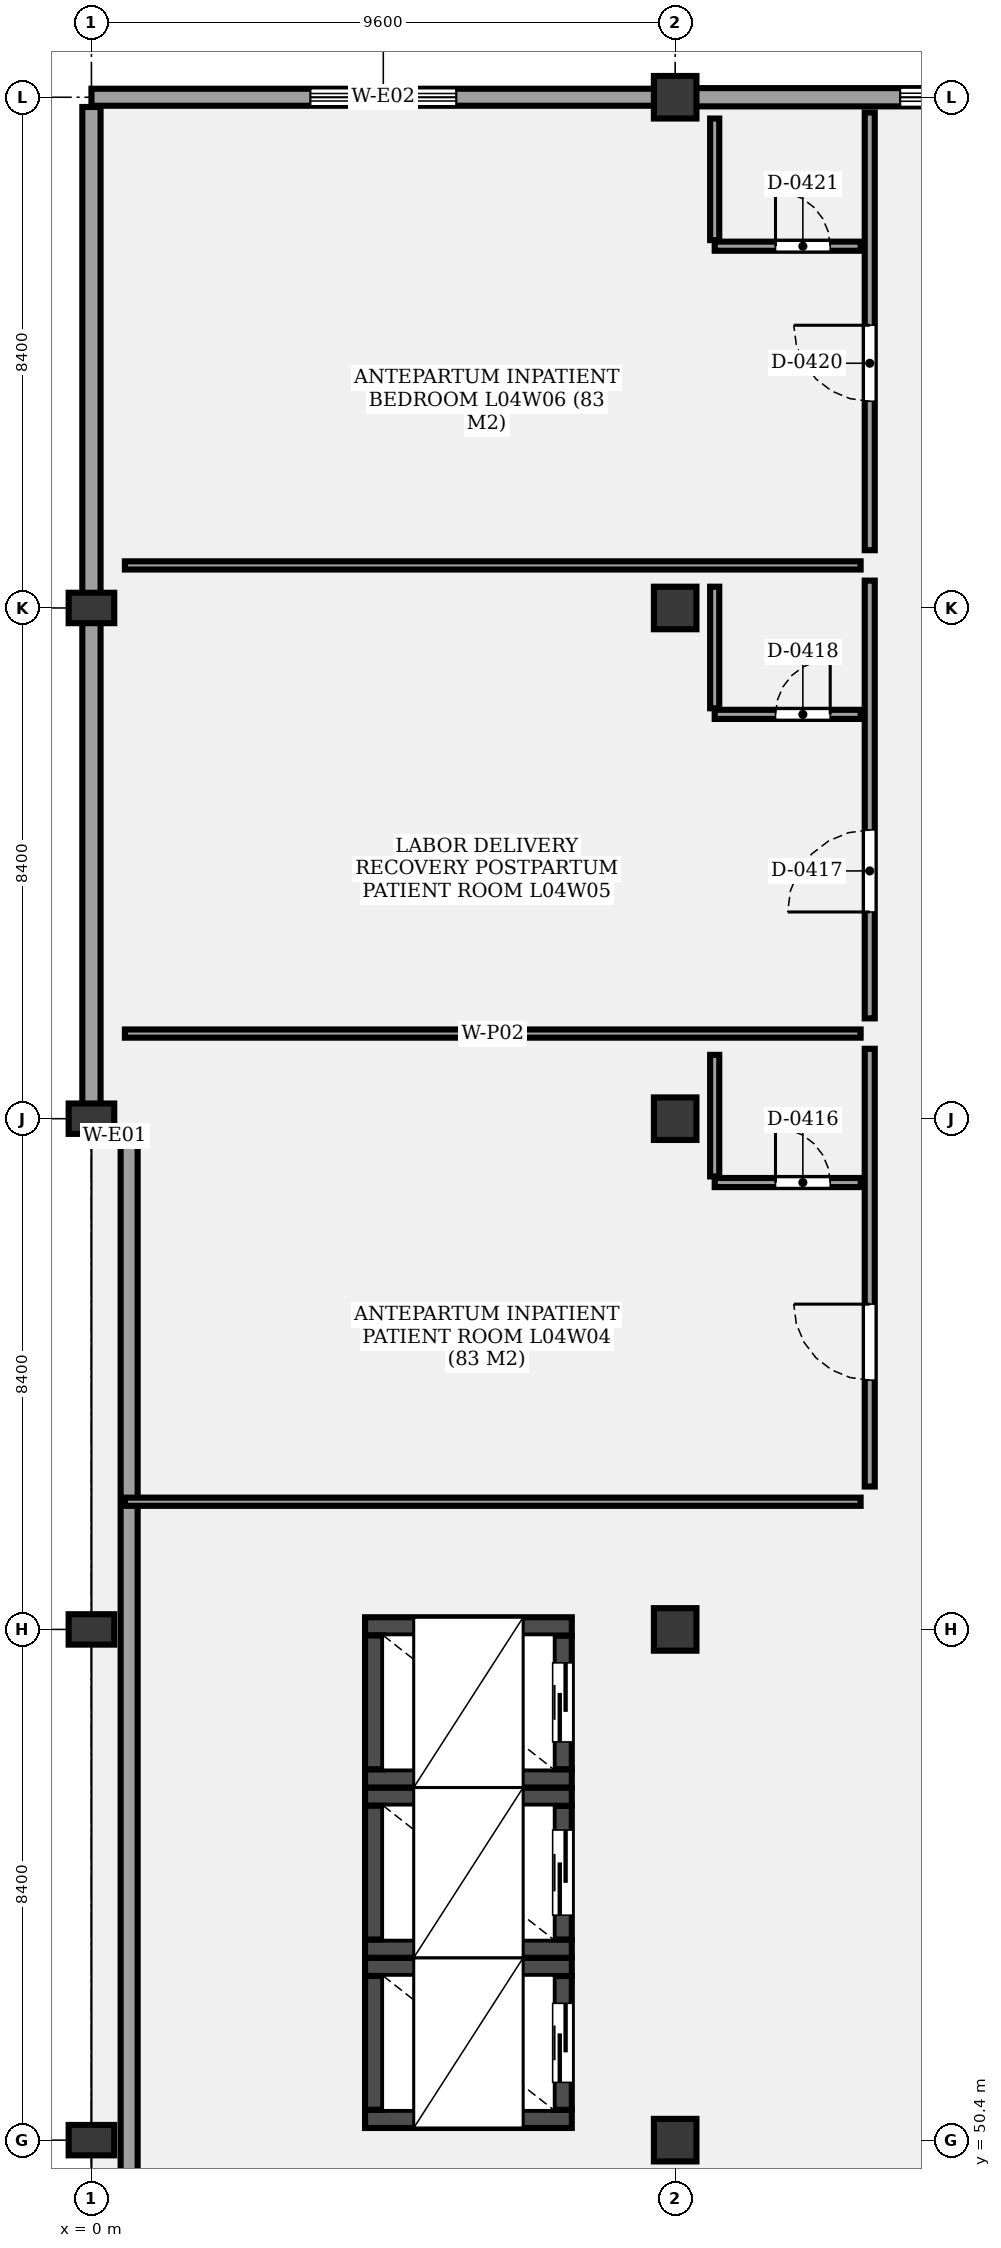
"""IFC4 building model, lengths in metres.
Left out: names, types, materials, properties, quantities, classifications, styles, units other than length and angle.
Written with IfcOpenShell. Run it as: python <this file> out.ifc"""

import sys

from ifc_helpers import new_model, si_unit, direction, frame, frame_2d, origin, origin_2d, place, context, subcontext, project, spatial, rectangle, extrude, element, fill, save


model = new_model("IFC4")
c1 = context("Model", 3, precision=1e-05, world=origin(), true_north=direction((0.0, 1.0)))
c2 = subcontext(c1, "Body", "Model", "MODEL_VIEW")
j1 = project(units=[si_unit("LENGTHUNIT", "METRE"), si_unit("PLANEANGLEUNIT", "RADIAN")], contexts=[c1])
p1 = place(None, origin())
s1 = spatial("IfcSite", under=j1, at=p1, CompositionType="ELEMENT")
p2 = place(p1, origin())
s2 = spatial("IfcBuilding", under=s1, at=p2, CompositionType="ELEMENT")
p3 = place(p2, frame((0.0, 0.0, 17.8)))
s3 = spatial("IfcBuildingStorey", under=s2, at=p3, CompositionType="ELEMENT", Elevation=17.8)
for number, where, z_axis, x_axis in (
    (1, (0.0, 50.4, 0.0), (0.0, 0.0, 1.0), (1.0, 0.0, 0.0)),
    (2, (0.0, 58.8, 0.0), (0.0, 0.0, 1.0), (1.0, 0.0, 0.0)),
    (3, (0.0, 67.2, 0.0), (0.0, 0.0, 1.0), (1.0, 0.0, 0.0)),
    (4, (0.0, 75.6, 0.0), (0.0, 0.0, 1.0), (1.0, 0.0, 0.0)),
):
    element("IfcColumn", number, at=place(p3, frame(where, z_axis=z_axis, x_axis=x_axis)), inside=s3, PredefinedType="COLUMN", context=c2, shape_type="SweptSolid", body=[
        extrude(rectangle(XDim=0.75, YDim=0.5, at=origin_2d()), origin(), (0.0, 0.0, 1.0), 4.2),
    ])
for number, where, z_axis, x_axis in (
    (5, (9.6, 50.4, 0.0), (0.0, 0.0, 1.0), (1.0, 0.0, 0.0)),
    (6, (9.6, 58.8, 0.0), (0.0, 0.0, 1.0), (1.0, 0.0, 0.0)),
    (7, (9.6, 67.2, 0.0), (0.0, 0.0, 1.0), (1.0, 0.0, 0.0)),
    (8, (9.6, 75.6, 0.0), (0.0, 0.0, 1.0), (1.0, 0.0, 0.0)),
    (9, (9.6, 84.0, 0.0), (0.0, 0.0, 1.0), (1.0, 0.0, 0.0)),
):
    element("IfcColumn", number, at=place(p3, frame(where, z_axis=z_axis, x_axis=x_axis)), inside=s3, PredefinedType="COLUMN", context=c2, shape_type="SweptSolid", body=[
        extrude(rectangle(XDim=0.7, YDim=0.7, at=origin_2d()), origin(), (0.0, 0.0, 1.0), 4.2),
    ])
p4 = place(p3, frame((4.5, 50.75, 0.0), z_axis=(0.0, 0.0, 1.0), x_axis=(1.0, 0.0, 0.0)))
e10 = element("IfcWall", 10, at=p4, inside=s3, PredefinedType="SHEAR", context=c2, shape_type="SweptSolid", body=[
    extrude(rectangle(XDim=3.4, YDim=0.3, at=frame_2d((1.7, 0.0))), origin(), (0.0, 0.0, 1.0), 4.2),
])
p5 = place(p3, frame((7.75, 50.9, 0.0), z_axis=(0.0, 0.0, 1.0), x_axis=(0.0, 1.0, 0.0)))
e11 = element("IfcWall", 11, at=p5, inside=s3, PredefinedType="SHEAR", context=c2, shape_type="SweptSolid", body=[
    extrude(rectangle(XDim=2.2, YDim=0.3, at=frame_2d((1.1, 0.0))), origin(), (0.0, 0.0, 1.0), 4.2),
])
p6 = place(p5, frame((0.45, 0.0, 0.0)))
e12 = element("IfcOpeningElement", 12, at=p6, cuts=e11, PredefinedType="OPENING", context=c2, shape_type="SweptSolid", body=[
    extrude(rectangle(XDim=1.3, YDim=2.3, at=frame_2d((0.65, 1.15))), frame((0.0, 0.16, 0.0), z_axis=(0.0, -1.0, 0.0), x_axis=(1.0, 0.0, 0.0)), (0.0, 0.0, 1.0), 0.32),
])
p7 = place(p3, frame((7.9, 53.25, 0.0), z_axis=(0.0, 0.0, 1.0), x_axis=(-1.0, 0.0, 0.0)))
e13 = element("IfcWall", 13, at=p7, inside=s3, PredefinedType="SHEAR", context=c2, shape_type="SweptSolid", body=[
    extrude(rectangle(XDim=3.4, YDim=0.3, at=frame_2d((1.7, 0.0))), origin(), (0.0, 0.0, 1.0), 4.2),
])
p8 = place(p3, frame((4.65, 53.1, 0.0), z_axis=(0.0, 0.0, 1.0), x_axis=(0.0, -1.0, 0.0)))
e14 = element("IfcWall", 14, at=p8, inside=s3, PredefinedType="SHEAR", context=c2, shape_type="SweptSolid", body=[
    extrude(rectangle(XDim=2.2, YDim=0.3, at=frame_2d((1.1, 0.0))), origin(), (0.0, 0.0, 1.0), 4.2),
])
p9 = place(p3, frame((4.5, 53.55, 0.0), z_axis=(0.0, 0.0, 1.0), x_axis=(1.0, 0.0, 0.0)))
e15 = element("IfcWall", 15, at=p9, inside=s3, PredefinedType="SHEAR", context=c2, shape_type="SweptSolid", body=[
    extrude(rectangle(XDim=3.4, YDim=0.3, at=frame_2d((1.7, 0.0))), origin(), (0.0, 0.0, 1.0), 4.2),
])
p10 = place(p3, frame((7.75, 53.7, 0.0), z_axis=(0.0, 0.0, 1.0), x_axis=(0.0, 1.0, 0.0)))
e16 = element("IfcWall", 16, at=p10, inside=s3, PredefinedType="SHEAR", context=c2, shape_type="SweptSolid", body=[
    extrude(rectangle(XDim=2.2, YDim=0.3, at=frame_2d((1.1, 0.0))), origin(), (0.0, 0.0, 1.0), 4.2),
])
p11 = place(p10, frame((0.4, 0.0, 0.0)))
e17 = element("IfcOpeningElement", 17, at=p11, cuts=e16, PredefinedType="OPENING", context=c2, shape_type="SweptSolid", body=[
    extrude(rectangle(XDim=1.4, YDim=2.3, at=frame_2d((0.7, 1.15))), frame((0.0, 0.16, 0.0), z_axis=(0.0, -1.0, 0.0), x_axis=(1.0, 0.0, 0.0)), (0.0, 0.0, 1.0), 0.32),
])
p12 = place(p3, frame((7.9, 56.05, 0.0), z_axis=(0.0, 0.0, 1.0), x_axis=(-1.0, 0.0, 0.0)))
e18 = element("IfcWall", 18, at=p12, inside=s3, PredefinedType="SHEAR", context=c2, shape_type="SweptSolid", body=[
    extrude(rectangle(XDim=3.4, YDim=0.3, at=frame_2d((1.7, 0.0))), origin(), (0.0, 0.0, 1.0), 4.2),
])
p13 = place(p3, frame((4.65, 55.9, 0.0), z_axis=(0.0, 0.0, 1.0), x_axis=(0.0, -1.0, 0.0)))
e19 = element("IfcWall", 19, at=p13, inside=s3, PredefinedType="SHEAR", context=c2, shape_type="SweptSolid", body=[
    extrude(rectangle(XDim=2.2, YDim=0.3, at=frame_2d((1.1, 0.0))), origin(), (0.0, 0.0, 1.0), 4.2),
])
p14 = place(p3, frame((4.5, 56.35, 0.0), z_axis=(0.0, 0.0, 1.0), x_axis=(1.0, 0.0, 0.0)))
e20 = element("IfcWall", 20, at=p14, inside=s3, PredefinedType="SHEAR", context=c2, shape_type="SweptSolid", body=[
    extrude(rectangle(XDim=3.4, YDim=0.3, at=frame_2d((1.7, 0.0))), origin(), (0.0, 0.0, 1.0), 4.2),
])
p15 = place(p3, frame((7.75, 56.5, 0.0), z_axis=(0.0, 0.0, 1.0), x_axis=(0.0, 1.0, 0.0)))
e21 = element("IfcWall", 21, at=p15, inside=s3, PredefinedType="SHEAR", context=c2, shape_type="SweptSolid", body=[
    extrude(rectangle(XDim=2.2, YDim=0.3, at=frame_2d((1.1, 0.0))), origin(), (0.0, 0.0, 1.0), 4.2),
])
p16 = place(p15, frame((0.45, 0.0, 0.0)))
e22 = element("IfcOpeningElement", 22, at=p16, cuts=e21, PredefinedType="OPENING", context=c2, shape_type="SweptSolid", body=[
    extrude(rectangle(XDim=1.3, YDim=2.3, at=frame_2d((0.65, 1.15))), frame((0.0, 0.16, 0.0), z_axis=(0.0, -1.0, 0.0), x_axis=(1.0, 0.0, 0.0)), (0.0, 0.0, 1.0), 0.32),
])
p17 = place(p3, frame((7.9, 58.85, 0.0), z_axis=(0.0, 0.0, 1.0), x_axis=(-1.0, 0.0, 0.0)))
e23 = element("IfcWall", 23, at=p17, inside=s3, PredefinedType="SHEAR", context=c2, shape_type="SweptSolid", body=[
    extrude(rectangle(XDim=3.4, YDim=0.3, at=frame_2d((1.7, 0.0))), origin(), (0.0, 0.0, 1.0), 4.2),
])
p18 = place(p3, frame((4.65, 58.7, 0.0), z_axis=(0.0, 0.0, 1.0), x_axis=(0.0, -1.0, 0.0)))
e24 = element("IfcWall", 24, at=p18, inside=s3, PredefinedType="SHEAR", context=c2, shape_type="SweptSolid", body=[
    extrude(rectangle(XDim=2.2, YDim=0.3, at=frame_2d((1.1, 0.0))), origin(), (0.0, 0.0, 1.0), 4.2),
])
p19 = place(p3, frame((0.0, 84.0, 0.0), z_axis=(0.0, 0.0, 1.0), x_axis=(1.0, 0.0, 0.0)))
e25 = element("IfcWall", 25, at=p19, inside=s3, PredefinedType="SOLIDWALL", context=c2, shape_type="SweptSolid", body=[
    extrude(rectangle(XDim=9.6, YDim=0.28, at=frame_2d((4.8, 0.0))), origin(), (0.0, 0.0, 1.0), 3.39),
])
p20 = place(p19, frame((3.6, 0.0, 0.85)))
e26 = element("IfcOpeningElement", 26, at=p20, cuts=e25, PredefinedType="OPENING", context=c2, shape_type="SweptSolid", body=[
    extrude(rectangle(XDim=2.4, YDim=1.2, at=frame_2d((1.2, 0.6))), frame((0.0, 0.15, 0.0), z_axis=(0.0, -1.0, 0.0), x_axis=(1.0, 0.0, 0.0)), (0.0, 0.0, 1.0), 0.3),
])
p21 = place(p3, frame((9.6, 84.0, 0.0), z_axis=(0.0, 0.0, 1.0), x_axis=(1.0, 0.0, 0.0)))
e27 = element("IfcWall", 27, at=p21, inside=s3, PredefinedType="SOLIDWALL", context=c2, shape_type="SweptSolid", body=[
    extrude(rectangle(XDim=9.6, YDim=0.3, at=frame_2d((4.8, 0.0))), origin(), (0.0, 0.0, 1.0), 3.39),
])
p22 = place(p21, frame((3.7, 0.0, 0.85)))
e28 = element("IfcOpeningElement", 28, at=p22, cuts=e27, PredefinedType="OPENING", context=c2, shape_type="SweptSolid", body=[
    extrude(rectangle(XDim=2.2, YDim=1.2, at=frame_2d((1.1, 0.6))), frame((0.0, 0.16, 0.0), z_axis=(0.0, -1.0, 0.0), x_axis=(1.0, 0.0, 0.0)), (0.0, 0.0, 1.0), 0.32),
])
p23 = place(p3, frame((0.2, 66.92, 0.0), z_axis=(0.0, 0.0, 1.0), x_axis=(1.0, 0.0, 0.0)))
e29 = element("IfcWall", 29, at=p23, inside=s3, PredefinedType="SOLIDWALL", context=c2, shape_type="SweptSolid", body=[
    extrude(rectangle(XDim=0.36, YDim=0.26, at=frame_2d((0.18, 0.0))), origin(), (0.0, 0.0, 1.0), 3.39),
])
p24 = place(p3, frame((0.62, 34.18, 0.0), z_axis=(0.0, 0.0, 1.0), x_axis=(0.0, 1.0, 0.0)))
e30 = element("IfcWall", 30, at=p24, inside=s3, PredefinedType="SOLIDWALL", context=c2, shape_type="SweptSolid", body=[
    extrude(rectangle(XDim=32.6, YDim=0.28, at=frame_2d((16.3, 0.0))), origin(), (0.0, 0.0, 1.0), 3.39),
])
p25 = place(p3, frame((0.0, 67.2, 0.0), z_axis=(0.0, 0.0, 1.0), x_axis=(0.0, 1.0, 0.0)))
e31 = element("IfcWall", 31, at=p25, inside=s3, PredefinedType="SOLIDWALL", context=c2, shape_type="SweptSolid", body=[
    extrude(rectangle(XDim=16.64, YDim=0.3, at=frame_2d((8.32, 0.0))), origin(), (0.0, 0.0, 1.0), 3.39),
])
p26 = place(p3, frame((12.8, 61.15, 0.0), z_axis=(0.0, 0.0, 1.0), x_axis=(0.0, 1.0, 0.0)))
e32 = element("IfcWall", 32, at=p26, inside=s3, PredefinedType="PARTITIONING", context=c2, shape_type="SweptSolid", body=[
    extrude(rectangle(XDim=7.2, YDim=0.165, at=frame_2d((3.6, 0.0))), origin(), (0.0, 0.0, 1.0), 3.3),
])
p27 = place(p26, frame((1.75, 0.0, 0.0)))
e33 = element("IfcOpeningElement", 33, at=p27, cuts=e32, PredefinedType="OPENING", context=c2, shape_type="SweptSolid", body=[
    extrude(rectangle(XDim=1.25, YDim=2.2, at=frame_2d((0.625, 1.1))), frame((0.0, 0.093, 0.0), z_axis=(0.0, -1.0, 0.0), x_axis=(1.0, 0.0, 0.0)), (0.0, 0.0, 1.0), 0.185),
])
p28 = place(p3, frame((10.25, 66.15, 0.0), z_axis=(0.0, 0.0, 1.0), x_axis=(1.0, 0.0, 0.0)))
e34 = element("IfcWall", 34, at=p28, inside=s3, PredefinedType="PARTITIONING", context=c2, shape_type="SweptSolid", body=[
    extrude(rectangle(XDim=2.4, YDim=0.15, at=frame_2d((1.2, 0.0))), origin(), (0.0, 0.0, 1.0), 3.3),
])
p29 = place(p28, frame((1.0, 0.0, 0.0)))
e35 = element("IfcOpeningElement", 35, at=p29, cuts=e34, PredefinedType="OPENING", context=c2, shape_type="SweptSolid", body=[
    extrude(rectangle(XDim=0.9, YDim=2.1, at=frame_2d((0.45, 1.05))), frame((0.0, 0.085, 0.0), z_axis=(0.0, -1.0, 0.0), x_axis=(1.0, 0.0, 0.0)), (0.0, 0.0, 1.0), 0.17),
])
p30 = place(p3, frame((10.25, 66.25, 0.0), z_axis=(0.0, 0.0, 1.0), x_axis=(0.0, 1.0, 0.0)))
e36 = element("IfcWall", 36, at=p30, inside=s3, PredefinedType="PARTITIONING", context=c2, shape_type="SweptSolid", body=[
    extrude(rectangle(XDim=2.0, YDim=0.15, at=frame_2d((1.0, 0.0))), origin(), (0.0, 0.0, 1.0), 3.3),
])
p31 = place(p3, frame((0.55, 60.9, 0.0), z_axis=(0.0, 0.0, 1.0), x_axis=(1.0, 0.0, 0.0)))
e37 = element("IfcWall", 37, at=p31, inside=s3, PredefinedType="PARTITIONING", context=c2, shape_type="SweptSolid", body=[
    extrude(rectangle(XDim=12.1, YDim=0.135, at=frame_2d((6.05, 0.0))), origin(), (0.0, 0.0, 1.0), 3.3),
])
p32 = place(p3, frame((12.8, 68.85, 0.0), z_axis=(0.0, 0.0, 1.0), x_axis=(0.0, 1.0, 0.0)))
e38 = element("IfcWall", 38, at=p32, inside=s3, PredefinedType="PARTITIONING", context=c2, shape_type="SweptSolid", body=[
    extrude(rectangle(XDim=7.2, YDim=0.165, at=frame_2d((3.6, 0.0))), origin(), (0.0, 0.0, 1.0), 3.3),
])
p33 = place(p32, frame((1.75, 0.0, 0.0)))
e39 = element("IfcOpeningElement", 39, at=p33, cuts=e38, PredefinedType="OPENING", context=c2, shape_type="SweptSolid", body=[
    extrude(rectangle(XDim=1.35, YDim=2.4, at=frame_2d((0.675, 1.2))), frame((0.0, 0.093, 0.0), z_axis=(0.0, -1.0, 0.0), x_axis=(1.0, 0.0, 0.0)), (0.0, 0.0, 1.0), 0.185),
])
p34 = place(p3, frame((10.25, 73.85, 0.0), z_axis=(0.0, 0.0, 1.0), x_axis=(1.0, 0.0, 0.0)))
e40 = element("IfcWall", 40, at=p34, inside=s3, PredefinedType="PARTITIONING", context=c2, shape_type="SweptSolid", body=[
    extrude(rectangle(XDim=2.4, YDim=0.15, at=frame_2d((1.2, 0.0))), origin(), (0.0, 0.0, 1.0), 3.3),
])
p35 = place(p34, frame((1.0, 0.0, 0.0)))
e41 = element("IfcOpeningElement", 41, at=p35, cuts=e40, PredefinedType="OPENING", context=c2, shape_type="SweptSolid", body=[
    extrude(rectangle(XDim=0.9, YDim=2.1, at=frame_2d((0.45, 1.05))), frame((0.0, 0.085, 0.0), z_axis=(0.0, -1.0, 0.0), x_axis=(1.0, 0.0, 0.0)), (0.0, 0.0, 1.0), 0.17),
])
p36 = place(p3, frame((10.25, 73.95, 0.0), z_axis=(0.0, 0.0, 1.0), x_axis=(0.0, 1.0, 0.0)))
e42 = element("IfcWall", 42, at=p36, inside=s3, PredefinedType="PARTITIONING", context=c2, shape_type="SweptSolid", body=[
    extrude(rectangle(XDim=2.0, YDim=0.15, at=frame_2d((1.0, 0.0))), origin(), (0.0, 0.0, 1.0), 3.3),
])
p37 = place(p3, frame((0.55, 68.6, 0.0), z_axis=(0.0, 0.0, 1.0), x_axis=(1.0, 0.0, 0.0)))
e43 = element("IfcWall", 43, at=p37, inside=s3, PredefinedType="PARTITIONING", context=c2, shape_type="SweptSolid", body=[
    extrude(rectangle(XDim=12.1, YDim=0.135, at=frame_2d((6.05, 0.0))), origin(), (0.0, 0.0, 1.0), 3.3),
])
p38 = place(p3, frame((12.8, 76.55, 0.0), z_axis=(0.0, 0.0, 1.0), x_axis=(0.0, 1.0, 0.0)))
e44 = element("IfcWall", 44, at=p38, inside=s3, PredefinedType="PARTITIONING", context=c2, shape_type="SweptSolid", body=[
    extrude(rectangle(XDim=7.2, YDim=0.165, at=frame_2d((3.6, 0.0))), origin(), (0.0, 0.0, 1.0), 3.3),
])
p39 = place(p38, frame((2.45, 0.0, 0.0)))
e45 = element("IfcOpeningElement", 45, at=p39, cuts=e44, PredefinedType="OPENING", context=c2, shape_type="SweptSolid", body=[
    extrude(rectangle(XDim=1.25, YDim=2.2, at=frame_2d((0.625, 1.1))), frame((0.0, 0.093, 0.0), z_axis=(0.0, -1.0, 0.0), x_axis=(1.0, 0.0, 0.0)), (0.0, 0.0, 1.0), 0.185),
])
p40 = place(p3, frame((10.25, 81.55, 0.0), z_axis=(0.0, 0.0, 1.0), x_axis=(1.0, 0.0, 0.0)))
e46 = element("IfcWall", 46, at=p40, inside=s3, PredefinedType="PARTITIONING", context=c2, shape_type="SweptSolid", body=[
    extrude(rectangle(XDim=2.4, YDim=0.15, at=frame_2d((1.2, 0.0))), origin(), (0.0, 0.0, 1.0), 3.3),
])
p41 = place(p40, frame((1.0, 0.0, 0.0)))
e47 = element("IfcOpeningElement", 47, at=p41, cuts=e46, PredefinedType="OPENING", context=c2, shape_type="SweptSolid", body=[
    extrude(rectangle(XDim=0.9, YDim=2.1, at=frame_2d((0.45, 1.05))), frame((0.0, 0.085, 0.0), z_axis=(0.0, -1.0, 0.0), x_axis=(1.0, 0.0, 0.0)), (0.0, 0.0, 1.0), 0.17),
])
p42 = place(p3, frame((10.25, 81.65, 0.0), z_axis=(0.0, 0.0, 1.0), x_axis=(0.0, 1.0, 0.0)))
e48 = element("IfcWall", 48, at=p42, inside=s3, PredefinedType="PARTITIONING", context=c2, shape_type="SweptSolid", body=[
    extrude(rectangle(XDim=2.0, YDim=0.15, at=frame_2d((1.0, 0.0))), origin(), (0.0, 0.0, 1.0), 3.3),
])
p43 = place(p3, frame((0.55, 76.3, 0.0), z_axis=(0.0, 0.0, 1.0), x_axis=(1.0, 0.0, 0.0)))
e49 = element("IfcWall", 49, at=p43, inside=s3, PredefinedType="PARTITIONING", context=c2, shape_type="SweptSolid", body=[
    extrude(rectangle(XDim=12.1, YDim=0.135, at=frame_2d((6.05, 0.0))), origin(), (0.0, 0.0, 1.0), 3.3),
])
p44 = place(p6, origin())
e50 = element("IfcDoor", 50, at=p44, inside=s3, OperationType="SLIDING_TO_LEFT", PredefinedType="DOOR", context=c2, shape_type="SweptSolid", body=[
    extrude(rectangle(XDim=1.3, YDim=2.3, at=frame_2d((0.65, 1.15))), frame((0.0, 0.025, 0.0), z_axis=(0.0, -1.0, 0.0), x_axis=(1.0, 0.0, 0.0)), (0.0, 0.0, 1.0), 0.05),
])
fill(e12, e50)
p45 = place(p11, origin())
e51 = element("IfcDoor", 51, at=p45, inside=s3, OperationType="SLIDING_TO_RIGHT", PredefinedType="DOOR", context=c2, shape_type="SweptSolid", body=[
    extrude(rectangle(XDim=1.4, YDim=2.3, at=frame_2d((0.7, 1.15))), frame((0.0, 0.025, 0.0), z_axis=(0.0, -1.0, 0.0), x_axis=(1.0, 0.0, 0.0)), (0.0, 0.0, 1.0), 0.05),
])
fill(e17, e51)
p46 = place(p16, origin())
e52 = element("IfcDoor", 52, at=p46, inside=s3, OperationType="SLIDING_TO_LEFT", PredefinedType="DOOR", context=c2, shape_type="SweptSolid", body=[
    extrude(rectangle(XDim=1.3, YDim=2.3, at=frame_2d((0.65, 1.15))), frame((0.0, 0.025, 0.0), z_axis=(0.0, -1.0, 0.0), x_axis=(1.0, 0.0, 0.0)), (0.0, 0.0, 1.0), 0.05),
])
fill(e22, e52)
p47 = place(p20, origin())
e53 = element("IfcWindow", 53, at=p47, inside=s3, PartitioningType="SINGLE_PANEL", PredefinedType="WINDOW", context=c2, shape_type="SweptSolid", body=[
    extrude(rectangle(XDim=2.4, YDim=1.2, at=frame_2d((1.2, 0.6))), frame((0.0, 0.03, 0.0), z_axis=(0.0, -1.0, 0.0), x_axis=(1.0, 0.0, 0.0)), (0.0, 0.0, 1.0), 0.06),
])
fill(e26, e53)
p48 = place(p22, origin())
e54 = element("IfcWindow", 54, at=p48, inside=s3, PartitioningType="SINGLE_PANEL", PredefinedType="WINDOW", context=c2, shape_type="SweptSolid", body=[
    extrude(rectangle(XDim=2.2, YDim=1.2, at=frame_2d((1.1, 0.6))), frame((0.0, 0.03, 0.0), z_axis=(0.0, -1.0, 0.0), x_axis=(1.0, 0.0, 0.0)), (0.0, 0.0, 1.0), 0.06),
])
fill(e28, e54)
p49 = place(p27, origin())
e55 = element("IfcDoor", 55, at=p49, inside=s3, OperationType="SINGLE_SWING_RIGHT", PredefinedType="DOOR", context=c2, shape_type="SweptSolid", body=[
    extrude(rectangle(XDim=1.25, YDim=2.2, at=frame_2d((0.625, 1.1))), frame((0.0, 0.025, 0.0), z_axis=(0.0, -1.0, 0.0), x_axis=(1.0, 0.0, 0.0)), (0.0, 0.0, 1.0), 0.05),
])
fill(e33, e55)
p50 = place(p29, origin())
e56 = element("IfcDoor", 56, at=p50, inside=s3, OperationType="SINGLE_SWING_LEFT", PredefinedType="DOOR", context=c2, shape_type="SweptSolid", body=[
    extrude(rectangle(XDim=0.9, YDim=2.1, at=frame_2d((0.45, 1.05))), frame((0.0, 0.025, 0.0), z_axis=(0.0, -1.0, 0.0), x_axis=(1.0, 0.0, 0.0)), (0.0, 0.0, 1.0), 0.05),
])
fill(e35, e56)
p51 = place(p33, origin())
e57 = element("IfcDoor", 57, at=p51, inside=s3, OperationType="SINGLE_SWING_LEFT", PredefinedType="DOOR", context=c2, shape_type="SweptSolid", body=[
    extrude(rectangle(XDim=1.35, YDim=2.4, at=frame_2d((0.675, 1.2))), frame((0.0, 0.025, 0.0), z_axis=(0.0, -1.0, 0.0), x_axis=(1.0, 0.0, 0.0)), (0.0, 0.0, 1.0), 0.05),
])
fill(e39, e57)
p52 = place(p35, origin())
e58 = element("IfcDoor", 58, at=p52, inside=s3, OperationType="SINGLE_SWING_RIGHT", PredefinedType="DOOR", context=c2, shape_type="SweptSolid", body=[
    extrude(rectangle(XDim=0.9, YDim=2.1, at=frame_2d((0.45, 1.05))), frame((0.0, 0.025, 0.0), z_axis=(0.0, -1.0, 0.0), x_axis=(1.0, 0.0, 0.0)), (0.0, 0.0, 1.0), 0.05),
])
fill(e41, e58)
p53 = place(p39, origin())
e59 = element("IfcDoor", 59, at=p53, inside=s3, OperationType="SINGLE_SWING_RIGHT", PredefinedType="DOOR", context=c2, shape_type="SweptSolid", body=[
    extrude(rectangle(XDim=1.25, YDim=2.2, at=frame_2d((0.625, 1.1))), frame((0.0, 0.025, 0.0), z_axis=(0.0, -1.0, 0.0), x_axis=(1.0, 0.0, 0.0)), (0.0, 0.0, 1.0), 0.05),
])
fill(e45, e59)
p54 = place(p41, origin())
e60 = element("IfcDoor", 60, at=p54, inside=s3, OperationType="SINGLE_SWING_LEFT", PredefinedType="DOOR", context=c2, shape_type="SweptSolid", body=[
    extrude(rectangle(XDim=0.9, YDim=2.1, at=frame_2d((0.45, 1.05))), frame((0.0, 0.025, 0.0), z_axis=(0.0, -1.0, 0.0), x_axis=(1.0, 0.0, 0.0)), (0.0, 0.0, 1.0), 0.05),
])
fill(e47, e60)
save(model, sys.argv[1])
